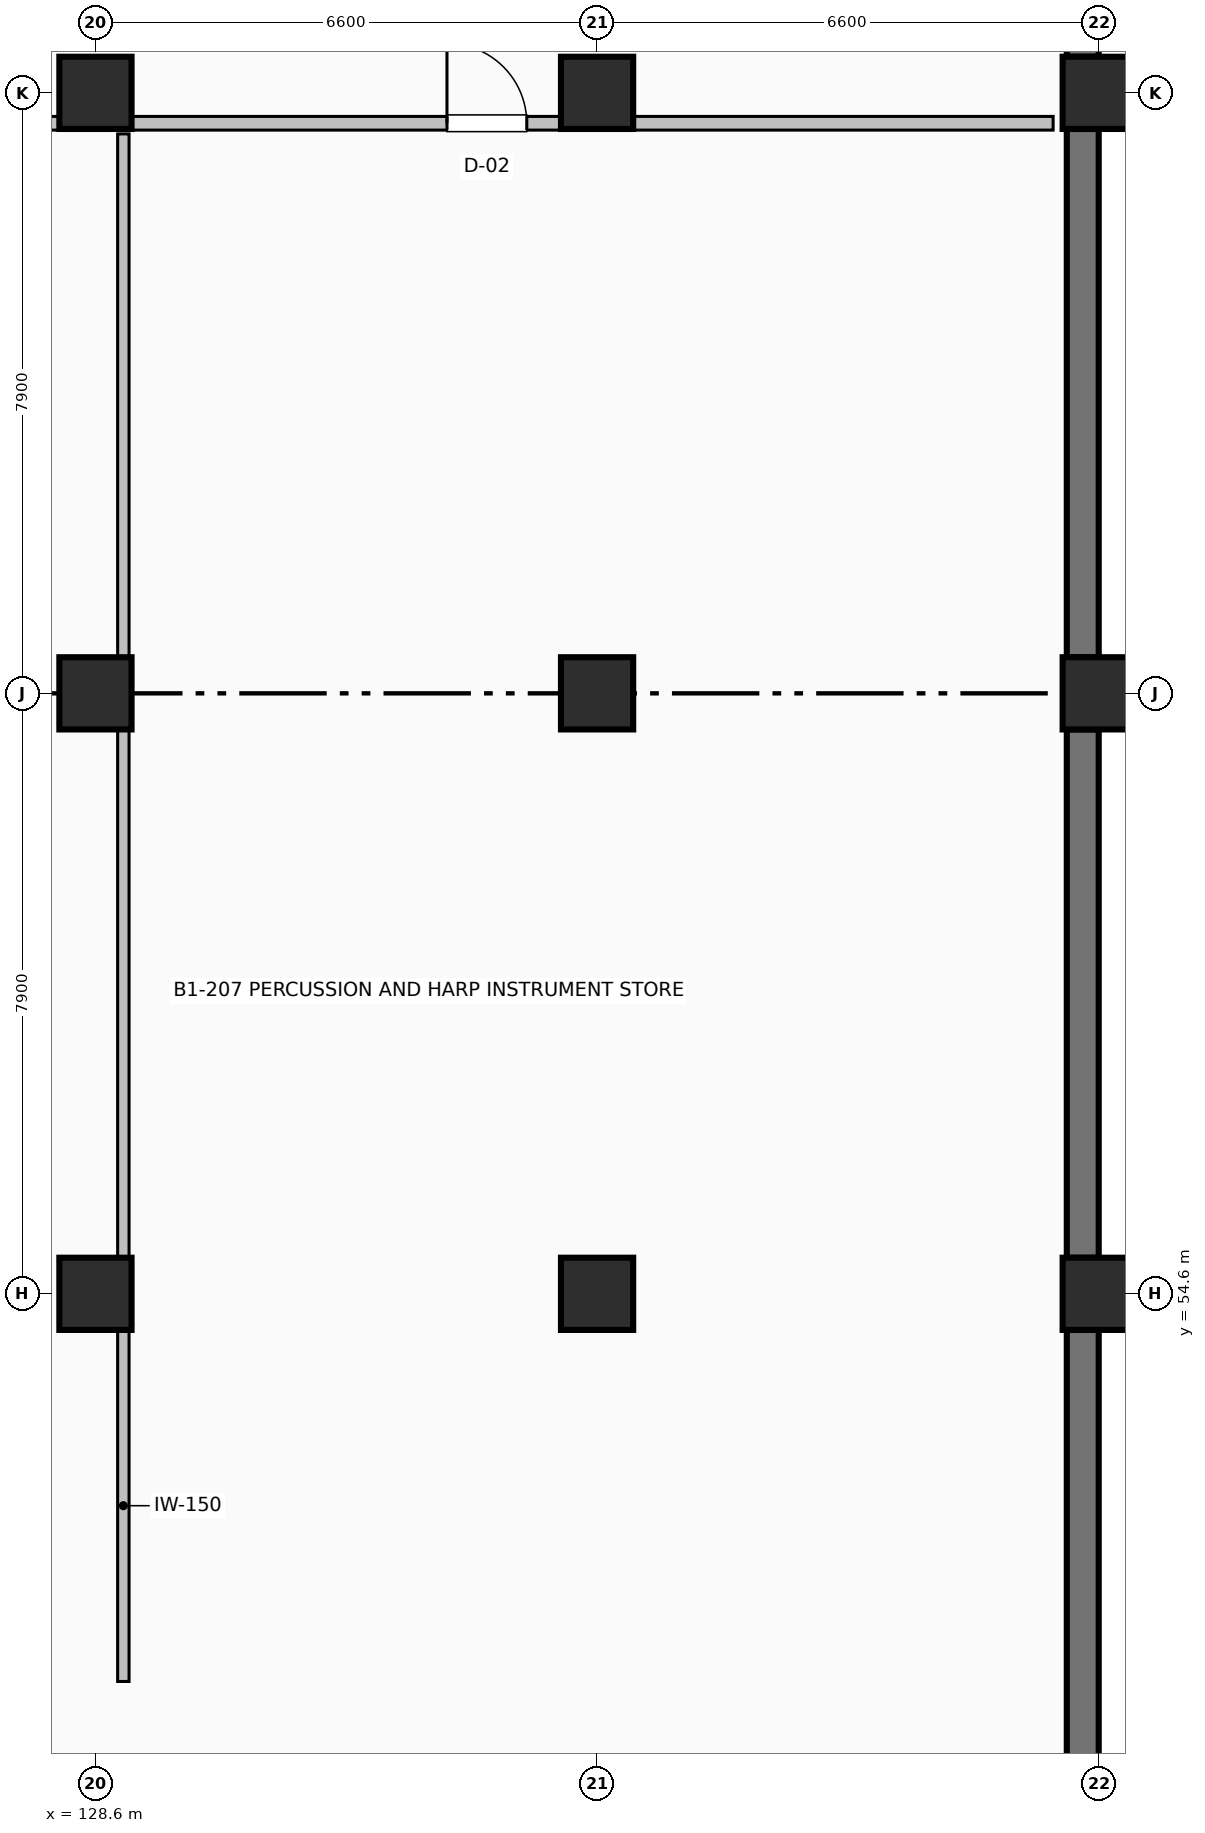
"""IFC4 building model, lengths in metres.
Left out: names, types, materials, properties, quantities, classifications, styles, units other than length and angle.
Written with IfcOpenShell. Run it as: python <this file> out.ifc"""

import sys

from ifc_helpers import new_model, si_unit, direction, frame, frame_2d, origin, origin_2d, place, context, subcontext, project, spatial, rectangle, extrude, element, fill, save


model = new_model("IFC4")
c1 = context("Model", 3, precision=1e-05, world=origin(), true_north=direction((0.0, 1.0)))
c2 = subcontext(c1, "Body", "Model", "MODEL_VIEW")
j1 = project(units=[si_unit("LENGTHUNIT", "METRE"), si_unit("PLANEANGLEUNIT", "RADIAN")], contexts=[c1])
p1 = place(None, origin())
s1 = spatial("IfcSite", under=j1, at=p1, CompositionType="ELEMENT")
p2 = place(p1, origin())
s2 = spatial("IfcBuilding", under=s1, at=p2, CompositionType="ELEMENT")
p3 = place(p2, frame((0.0, 0.0, -4.8)))
s3 = spatial("IfcBuildingStorey", under=s2, at=p3, CompositionType="ELEMENT", Elevation=-4.8)
for number, where, z_axis, x_axis in (
    (1, (128.6, 54.6, 0.0), (0.0, 0.0, 1.0), (1.0, 0.0, 0.0)),
    (2, (128.6, 62.5, 0.0), (0.0, 0.0, 1.0), (1.0, 0.0, 0.0)),
    (3, (128.6, 70.4, 0.0), (0.0, 0.0, 1.0), (1.0, 0.0, 0.0)),
    (4, (135.2, 54.6, 0.0), (0.0, 0.0, 1.0), (1.0, 0.0, 0.0)),
    (5, (135.2, 62.5, 0.0), (0.0, 0.0, 1.0), (1.0, 0.0, 0.0)),
    (6, (135.2, 70.4, 0.0), (0.0, 0.0, 1.0), (1.0, 0.0, 0.0)),
    (7, (141.8, 54.6, 0.0), (0.0, 0.0, 1.0), (1.0, 0.0, 0.0)),
    (8, (141.8, 62.5, 0.0), (0.0, 0.0, 1.0), (1.0, 0.0, 0.0)),
    (9, (141.8, 70.4, 0.0), (0.0, 0.0, 1.0), (1.0, 0.0, 0.0)),
):
    element("IfcColumn", number, at=place(p3, frame(where, z_axis=z_axis, x_axis=x_axis)), inside=s3, PredefinedType="COLUMN", context=c2, shape_type="SweptSolid", body=[
        extrude(rectangle(XDim=0.95, YDim=0.95, at=origin_2d()), origin(), (0.0, 0.0, 1.0), 4.8),
    ])
p4 = place(p3, frame((141.59, 77.925, 0.0), z_axis=(0.0, 0.0, 1.0), x_axis=(0.0, -1.0, 0.0)))
e10 = element("IfcWall", 10, at=p4, inside=s3, PredefinedType="SHEAR", context=c2, shape_type="SweptSolid", body=[
    extrude(rectangle(XDim=7.05, YDim=0.42, at=frame_2d((3.525, 0.0))), origin(), (0.0, 0.0, 1.0), 4.5),
])
for number, where, z_axis, x_axis in (
    (11, (141.59, 69.925, 0.0), (0.0, 0.0, 1.0), (0.0, -1.0, 0.0)),
    (12, (141.59, 62.025, 0.0), (0.0, 0.0, 1.0), (0.0, -1.0, 0.0)),
):
    element("IfcWall", number, at=place(p3, frame(where, z_axis=z_axis, x_axis=x_axis)), inside=s3, PredefinedType="SHEAR", context=c2, shape_type="SweptSolid", body=[
        extrude(rectangle(XDim=6.95, YDim=0.42, at=frame_2d((3.475, 0.0))), origin(), (0.0, 0.0, 1.0), 4.5),
    ])
p5 = place(p3, frame((141.59, 54.125, 0.0), z_axis=(0.0, 0.0, 1.0), x_axis=(0.0, -1.0, 0.0)))
e13 = element("IfcWall", 13, at=p5, inside=s3, PredefinedType="SHEAR", context=c2, shape_type="SweptSolid", body=[
    extrude(rectangle(XDim=7.05, YDim=0.42, at=frame_2d((3.525, 0.0))), origin(), (0.0, 0.0, 1.0), 4.5),
])
p6 = place(p3, frame((122.475, 70.0, 0.0), z_axis=(0.0, 0.0, 1.0), x_axis=(1.0, 0.0, 0.0)))
e14 = element("IfcWall", 14, at=p6, inside=s3, PredefinedType="PARTITIONING", context=c2, shape_type="SweptSolid", body=[
    extrude(rectangle(XDim=5.65, YDim=0.18, at=frame_2d((2.825, 0.0))), origin(), (0.0, 0.0, 1.0), 4.472),
])
p7 = place(p6, frame((0.438, 0.0, 0.0)))
e15 = element("IfcOpeningElement", 15, at=p7, cuts=e14, PredefinedType="OPENING", context=c2, shape_type="SweptSolid", body=[
    extrude(rectangle(XDim=1.2, YDim=2.1, at=frame_2d((0.6, 1.05))), frame((0.0, 0.1, 0.0), z_axis=(0.0, -1.0, 0.0), x_axis=(1.0, 0.0, 0.0)), (0.0, 0.0, 1.0), 0.2),
])
p8 = place(p3, frame((128.967, 49.5, 0.0), z_axis=(0.0, 0.0, 1.0), x_axis=(0.0, 1.0, 0.0)))
e16 = element("IfcWall", 16, at=p8, inside=s3, PredefinedType="PARTITIONING", context=c2, shape_type="SweptSolid", body=[
    extrude(rectangle(XDim=4.625, YDim=0.15, at=frame_2d((2.312, 0.0))), origin(), (0.0, 0.0, 1.0), 4.472),
])
p9 = place(p3, frame((128.967, 55.075, 0.0), z_axis=(0.0, 0.0, 1.0), x_axis=(0.0, 1.0, 0.0)))
e17 = element("IfcWall", 17, at=p9, inside=s3, PredefinedType="PARTITIONING", context=c2, shape_type="SweptSolid", body=[
    extrude(rectangle(XDim=6.95, YDim=0.15, at=frame_2d((3.475, 0.0))), origin(), (0.0, 0.0, 1.0), 4.472),
])
p10 = place(p3, frame((128.967, 62.975, 0.0), z_axis=(0.0, 0.0, 1.0), x_axis=(0.0, 1.0, 0.0)))
e18 = element("IfcWall", 18, at=p10, inside=s3, PredefinedType="PARTITIONING", context=c2, shape_type="SweptSolid", body=[
    extrude(rectangle(XDim=6.885, YDim=0.15, at=frame_2d((3.442, 0.0))), origin(), (0.0, 0.0, 1.0), 4.472),
])
p11 = place(p3, frame((129.075, 70.0, 0.0), z_axis=(0.0, 0.0, 1.0), x_axis=(1.0, 0.0, 0.0)))
e19 = element("IfcWall", 19, at=p11, inside=s3, PredefinedType="PARTITIONING", context=c2, shape_type="SweptSolid", body=[
    extrude(rectangle(XDim=5.65, YDim=0.18, at=frame_2d((2.825, 0.0))), origin(), (0.0, 0.0, 1.0), 4.472),
])
p12 = place(p11, frame((4.15, 0.0, 0.0)))
e20 = element("IfcOpeningElement", 20, at=p12, cuts=e19, PredefinedType="OPENING", context=c2, shape_type="SweptSolid", body=[
    extrude(rectangle(XDim=1.05, YDim=2.1, at=frame_2d((0.525, 1.05))), frame((0.0, 0.1, 0.0), z_axis=(0.0, -1.0, 0.0), x_axis=(1.0, 0.0, 0.0)), (0.0, 0.0, 1.0), 0.2),
])
p13 = place(p3, frame((135.675, 70.0, 0.0), z_axis=(0.0, 0.0, 1.0), x_axis=(1.0, 0.0, 0.0)))
e21 = element("IfcWall", 21, at=p13, inside=s3, PredefinedType="PARTITIONING", context=c2, shape_type="SweptSolid", body=[
    extrude(rectangle(XDim=5.525, YDim=0.18, at=frame_2d((2.762, 0.0))), origin(), (0.0, 0.0, 1.0), 4.472),
])
p14 = place(p12, origin())
e22 = element("IfcDoor", 22, at=p14, inside=s3, OperationType="SINGLE_SWING_LEFT", PredefinedType="DOOR", context=c2, shape_type="SweptSolid", body=[
    extrude(rectangle(XDim=1.05, YDim=2.1, at=frame_2d((0.525, 1.05))), frame((0.0, 0.025, 0.0), z_axis=(0.0, -1.0, 0.0), x_axis=(1.0, 0.0, 0.0)), (0.0, 0.0, 1.0), 0.05),
])
fill(e20, e22)
save(model, sys.argv[1])
